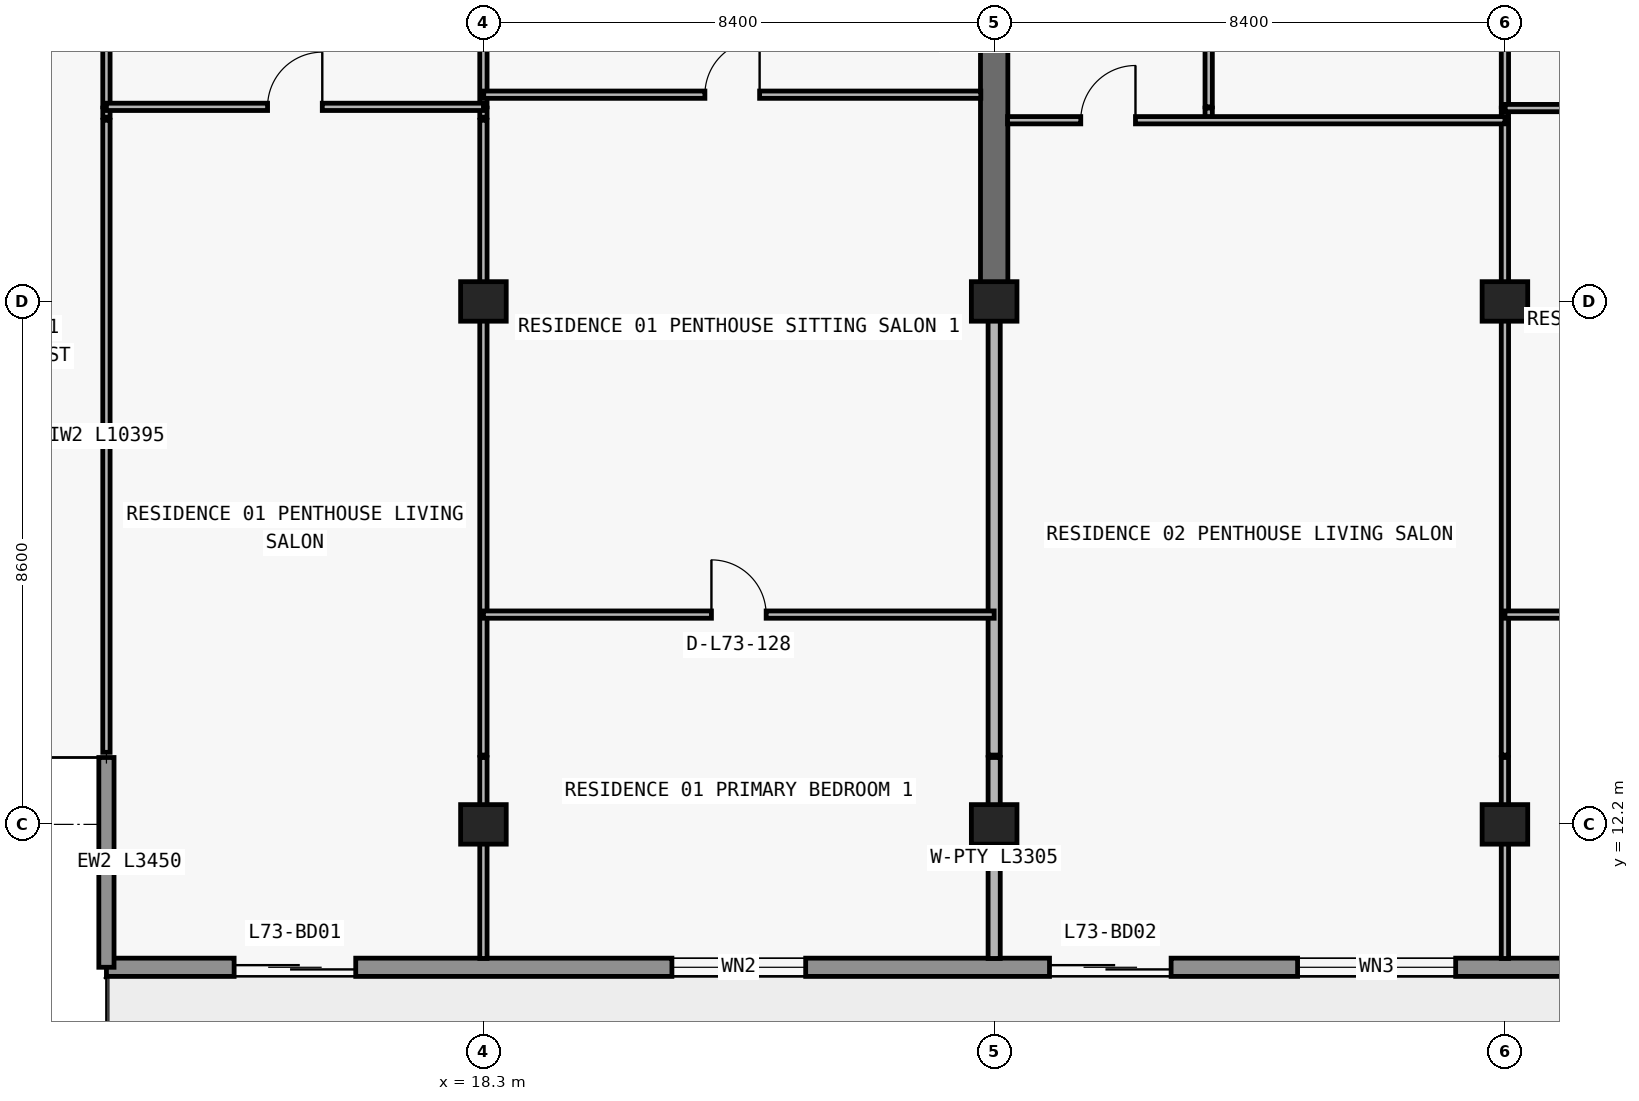
"""IFC4 building model, lengths in metres.
Left out: names, types, materials, properties, quantities, classifications, styles, units other than length and angle.
Written with IfcOpenShell. Run it as: python <this file> out.ifc"""

import sys

from ifc_helpers import new_model, si_unit, direction, frame, frame_2d, origin, origin_2d, place, context, subcontext, project, spatial, rectangle, extrude, element, fill, save


model = new_model("IFC4")
c1 = context("Model", 3, precision=1e-05, world=origin(), true_north=direction((0.0, 1.0)))
c2 = subcontext(c1, "Body", "Model", "MODEL_VIEW")
j1 = project(units=[si_unit("LENGTHUNIT", "METRE"), si_unit("PLANEANGLEUNIT", "RADIAN")], contexts=[c1])
p1 = place(None, origin())
s1 = spatial("IfcSite", under=j1, at=p1, CompositionType="ELEMENT")
p2 = place(p1, origin())
s2 = spatial("IfcBuilding", under=s1, at=p2, CompositionType="ELEMENT")
p3 = place(p2, frame((0.0, 0.0, 259.5)))
s3 = spatial("IfcBuildingStorey", under=s2, at=p3, CompositionType="ELEMENT", Elevation=259.5)
for number, where, z_axis, x_axis in (
    (1, (18.3, 12.2, 0.0), (0.0, 0.0, 1.0), (1.0, 0.0, 0.0)),
    (2, (26.7, 12.2, 0.0), (0.0, 0.0, 1.0), (1.0, 0.0, 0.0)),
    (3, (35.1, 12.2, 0.0), (0.0, 0.0, 1.0), (1.0, 0.0, 0.0)),
    (4, (18.3, 20.8, 0.0), (0.0, 0.0, 1.0), (1.0, 0.0, 0.0)),
    (5, (26.7, 20.8, 0.0), (0.0, 0.0, 1.0), (1.0, 0.0, 0.0)),
    (6, (35.1, 20.8, 0.0), (0.0, 0.0, 1.0), (1.0, 0.0, 0.0)),
):
    element("IfcColumn", number, at=place(p3, frame(where, z_axis=z_axis, x_axis=x_axis)), inside=s3, PredefinedType="COLUMN", context=c2, shape_type="SweptSolid", body=[
        extrude(rectangle(XDim=0.75, YDim=0.65, at=origin_2d()), origin(), (0.0, 0.0, 1.0), 3.05),
    ])
p4 = place(p3, frame((26.7, 20.8, 0.0), z_axis=(0.0, 0.0, 1.0), x_axis=(0.0, 1.0, 0.0)))
e7 = element("IfcWall", 7, at=p4, inside=s3, PredefinedType="SHEAR", context=c2, shape_type="SweptSolid", body=[
    extrude(rectangle(XDim=8.6, YDim=0.45, at=frame_2d((4.3, 0.0))), origin(), (0.0, 0.0, 1.0), 3.05),
])
p5 = place(p3, frame((65.7, 9.85, 0.0), z_axis=(0.0, 0.0, 1.0), x_axis=(-1.0, 0.0, 0.0)))
e8 = element("IfcWall", 8, at=p5, inside=s3, PredefinedType="STANDARD", context=c2, shape_type="SweptSolid", body=[
    extrude(rectangle(XDim=53.6, YDim=0.3, at=frame_2d((26.8, 0.0))), origin(), (0.0, 0.0, 1.0), 3.05),
])
p6 = place(p5, frame((49.5, 0.0, 0.0)))
e9 = element("IfcOpeningElement", 9, at=p6, cuts=e8, PredefinedType="OPENING", context=c2, shape_type="SweptSolid", body=[
    extrude(rectangle(XDim=2.0, YDim=2.3, at=frame_2d((1.0, 1.15))), frame((0.0, 0.16, 0.0), z_axis=(0.0, -1.0, 0.0), x_axis=(1.0, 0.0, 0.0)), (0.0, 0.0, 1.0), 0.32),
])
p7 = place(p5, frame((42.1, 0.0, 0.85)))
e10 = element("IfcOpeningElement", 10, at=p7, cuts=e8, PredefinedType="OPENING", context=c2, shape_type="SweptSolid", body=[
    extrude(rectangle(XDim=2.2, YDim=1.55, at=frame_2d((1.1, 0.775))), frame((0.0, 0.16, 0.0), z_axis=(0.0, -1.0, 0.0), x_axis=(1.0, 0.0, 0.0)), (0.0, 0.0, 1.0), 0.32),
])
p8 = place(p5, frame((36.09, 0.0, 0.0)))
e11 = element("IfcOpeningElement", 11, at=p8, cuts=e8, PredefinedType="OPENING", context=c2, shape_type="SweptSolid", body=[
    extrude(rectangle(XDim=2.0, YDim=2.3, at=frame_2d((1.0, 1.15))), frame((0.0, 0.16, 0.0), z_axis=(0.0, -1.0, 0.0), x_axis=(1.0, 0.0, 0.0)), (0.0, 0.0, 1.0), 0.32),
])
p9 = place(p5, frame((31.41, 0.0, 0.65)))
e12 = element("IfcOpeningElement", 12, at=p9, cuts=e8, PredefinedType="OPENING", context=c2, shape_type="SweptSolid", body=[
    extrude(rectangle(XDim=2.6, YDim=1.85, at=frame_2d((1.3, 0.925))), frame((0.0, 0.16, 0.0), z_axis=(0.0, -1.0, 0.0), x_axis=(1.0, 0.0, 0.0)), (0.0, 0.0, 1.0), 0.32),
])
p10 = place(p5, frame((25.7, 0.0, 0.85)))
e13 = element("IfcOpeningElement", 13, at=p10, cuts=e8, PredefinedType="OPENING", context=c2, shape_type="SweptSolid", body=[
    extrude(rectangle(XDim=2.2, YDim=1.55, at=frame_2d((1.1, 0.775))), frame((0.0, 0.16, 0.0), z_axis=(0.0, -1.0, 0.0), x_axis=(1.0, 0.0, 0.0)), (0.0, 0.0, 1.0), 0.32),
])
p11 = place(p5, frame((17.7, 0.0, 0.85)))
e14 = element("IfcOpeningElement", 14, at=p11, cuts=e8, PredefinedType="OPENING", context=c2, shape_type="SweptSolid", body=[
    extrude(rectangle(XDim=2.2, YDim=1.55, at=frame_2d((1.1, 0.775))), frame((0.0, 0.16, 0.0), z_axis=(0.0, -1.0, 0.0), x_axis=(1.0, 0.0, 0.0)), (0.0, 0.0, 1.0), 0.32),
])
p12 = place(p5, frame((11.626, 0.0, 0.0)))
e15 = element("IfcOpeningElement", 15, at=p12, cuts=e8, PredefinedType="OPENING", context=c2, shape_type="SweptSolid", body=[
    extrude(rectangle(XDim=2.0, YDim=2.3, at=frame_2d((1.0, 1.15))), frame((0.0, 0.16, 0.0), z_axis=(0.0, -1.0, 0.0), x_axis=(1.0, 0.0, 0.0)), (0.0, 0.0, 1.0), 0.32),
])
p13 = place(p5, frame((7.326, 0.0, 0.85)))
e16 = element("IfcOpeningElement", 16, at=p13, cuts=e8, PredefinedType="OPENING", context=c2, shape_type="SweptSolid", body=[
    extrude(rectangle(XDim=2.2, YDim=1.55, at=frame_2d((1.1, 0.775))), frame((0.0, 0.16, 0.0), z_axis=(0.0, -1.0, 0.0), x_axis=(1.0, 0.0, 0.0)), (0.0, 0.0, 1.0), 0.32),
])
p14 = place(p3, frame((12.1, 13.3, 0.0), z_axis=(0.0, 0.0, 1.0), x_axis=(0.0, -1.0, 0.0)))
e17 = element("IfcWall", 17, at=p14, inside=s3, PredefinedType="ELEMENTEDWALL", context=c2, shape_type="SweptSolid", body=[
    extrude(rectangle(XDim=3.45, YDim=0.25, at=frame_2d((1.725, 0.0))), origin(), (0.0, 0.0, 1.0), 3.05),
])
p15 = place(p3, frame((12.1, 13.385, 0.0), z_axis=(0.0, 0.0, 1.0), x_axis=(0.0, 1.0, 0.0)))
e18 = element("IfcWall", 18, at=p15, inside=s3, PredefinedType="PARTITIONING", context=c2, shape_type="SweptSolid", body=[
    extrude(rectangle(XDim=10.395, YDim=0.12, at=frame_2d((5.198, 0.0))), origin(), (0.0, 0.0, 1.0), 2.725),
])
p16 = place(p3, frame((12.1, 23.83, 0.0), z_axis=(0.0, 0.0, 1.0), x_axis=(0.0, 1.0, 0.0)))
e19 = element("IfcWall", 19, at=p16, inside=s3, PredefinedType="PARTITIONING", context=c2, shape_type="SweptSolid", body=[
    extrude(rectangle(XDim=0.15, YDim=0.12, at=frame_2d((0.075, 0.0))), origin(), (0.0, 0.0, 1.0), 2.725),
])
p17 = place(p3, frame((12.1, 24.0, 0.0), z_axis=(0.0, 0.0, 1.0), x_axis=(0.0, 1.0, 0.0)))
e20 = element("IfcWall", 20, at=p17, inside=s3, PredefinedType="PARTITIONING", context=c2, shape_type="SweptSolid", body=[
    extrude(rectangle(XDim=4.58, YDim=0.12, at=frame_2d((2.29, 0.0))), origin(), (0.0, 0.0, 1.0), 2.725),
])
p18 = place(p17, frame((1.84, 0.0, 0.0)))
e21 = element("IfcOpeningElement", 21, at=p18, cuts=e20, PredefinedType="OPENING", context=c2, shape_type="SweptSolid", body=[
    extrude(rectangle(XDim=0.9, YDim=2.15, at=frame_2d((0.45, 1.075))), frame((0.0, 0.07, 0.0), z_axis=(0.0, -1.0, 0.0), x_axis=(1.0, 0.0, 0.0)), (0.0, 0.0, 1.0), 0.14),
])
p19 = place(p3, frame((18.3, 9.995, 0.0), z_axis=(0.0, 0.0, 1.0), x_axis=(0.0, 1.0, 0.0)))
e22 = element("IfcWall", 22, at=p19, inside=s3, PredefinedType="PARTITIONING", context=c2, shape_type="SweptSolid", body=[
    extrude(rectangle(XDim=3.305, YDim=0.12, at=frame_2d((1.652, 0.0))), origin(), (0.0, 0.0, 1.0), 2.263),
])
p20 = place(p3, frame((18.3, 13.34, 0.0), z_axis=(0.0, 0.0, 1.0), x_axis=(0.0, 1.0, 0.0)))
e23 = element("IfcWall", 23, at=p20, inside=s3, PredefinedType="PARTITIONING", context=c2, shape_type="SweptSolid", body=[
    extrude(rectangle(XDim=10.44, YDim=0.12, at=frame_2d((5.22, 0.0))), origin(), (0.0, 0.0, 1.0), 2.263),
])
p21 = place(p3, frame((18.3, 23.83, 0.0), z_axis=(0.0, 0.0, 1.0), x_axis=(0.0, 1.0, 0.0)))
e24 = element("IfcWall", 24, at=p21, inside=s3, PredefinedType="PARTITIONING", context=c2, shape_type="SweptSolid", body=[
    extrude(rectangle(XDim=0.15, YDim=0.12, at=frame_2d((0.075, 0.0))), origin(), (0.0, 0.0, 1.0), 2.263),
])
p22 = place(p3, frame((18.3, 24.0, 0.0), z_axis=(0.0, 0.0, 1.0), x_axis=(0.0, 1.0, 0.0)))
e25 = element("IfcWall", 25, at=p22, inside=s3, PredefinedType="PARTITIONING", context=c2, shape_type="SweptSolid", body=[
    extrude(rectangle(XDim=4.58, YDim=0.12, at=frame_2d((2.29, 0.0))), origin(), (0.0, 0.0, 1.0), 2.263),
])
p23 = place(p22, frame((1.94, 0.0, 0.0)))
e26 = element("IfcOpeningElement", 26, at=p23, cuts=e25, PredefinedType="OPENING", context=c2, shape_type="SweptSolid", body=[
    extrude(rectangle(XDim=0.9, YDim=2.15, at=frame_2d((0.45, 1.075))), frame((0.0, 0.07, 0.0), z_axis=(0.0, -1.0, 0.0), x_axis=(1.0, 0.0, 0.0)), (0.0, 0.0, 1.0), 0.14),
])
p24 = place(p3, frame((26.7, 9.995, 0.0), z_axis=(0.0, 0.0, 1.0), x_axis=(0.0, 1.0, 0.0)))
e27 = element("IfcWall", 27, at=p24, inside=s3, PredefinedType="PARTITIONING", context=c2, shape_type="SweptSolid", body=[
    extrude(rectangle(XDim=3.305, YDim=0.2, at=frame_2d((1.652, 0.0))), origin(), (0.0, 0.0, 1.0), 2.263),
])
p25 = place(p3, frame((26.7, 13.34, 0.0), z_axis=(0.0, 0.0, 1.0), x_axis=(0.0, 1.0, 0.0)))
e28 = element("IfcWall", 28, at=p25, inside=s3, PredefinedType="PARTITIONING", context=c2, shape_type="SweptSolid", body=[
    extrude(rectangle(XDim=7.455, YDim=0.2, at=frame_2d((3.728, 0.0))), origin(), (0.0, 0.0, 1.0), 2.263),
])
p26 = place(p3, frame((30.228, 23.83, 0.0), z_axis=(0.0, 0.0, 1.0), x_axis=(0.0, 1.0, 0.0)))
e29 = element("IfcWall", 29, at=p26, inside=s3, PredefinedType="PARTITIONING", context=c2, shape_type="SweptSolid", body=[
    extrude(rectangle(XDim=0.15, YDim=0.12, at=frame_2d((0.075, 0.0))), origin(), (0.0, 0.0, 1.0), 3.05),
])
p27 = place(p3, frame((30.228, 24.0, 0.0), z_axis=(0.0, 0.0, 1.0), x_axis=(0.0, 1.0, 0.0)))
e30 = element("IfcWall", 30, at=p27, inside=s3, PredefinedType="PARTITIONING", context=c2, shape_type="SweptSolid", body=[
    extrude(rectangle(XDim=4.58, YDim=0.12, at=frame_2d((2.29, 0.0))), origin(), (0.0, 0.0, 1.0), 3.05),
])
p28 = place(p27, frame((1.84, 0.0, 0.0)))
e31 = element("IfcOpeningElement", 31, at=p28, cuts=e30, PredefinedType="OPENING", context=c2, shape_type="SweptSolid", body=[
    extrude(rectangle(XDim=0.9, YDim=2.15, at=frame_2d((0.45, 1.075))), frame((0.0, 0.07, 0.0), z_axis=(0.0, -1.0, 0.0), x_axis=(1.0, 0.0, 0.0)), (0.0, 0.0, 1.0), 0.14),
])
p29 = place(p3, frame((35.1, 9.995, 0.0), z_axis=(0.0, 0.0, 1.0), x_axis=(0.0, 1.0, 0.0)))
e32 = element("IfcWall", 32, at=p29, inside=s3, PredefinedType="PARTITIONING", context=c2, shape_type="SweptSolid", body=[
    extrude(rectangle(XDim=3.305, YDim=0.12, at=frame_2d((1.652, 0.0))), origin(), (0.0, 0.0, 1.0), 2.263),
])
p30 = place(p3, frame((35.1, 13.34, 0.0), z_axis=(0.0, 0.0, 1.0), x_axis=(0.0, 1.0, 0.0)))
e33 = element("IfcWall", 33, at=p30, inside=s3, PredefinedType="PARTITIONING", context=c2, shape_type="SweptSolid", body=[
    extrude(rectangle(XDim=10.44, YDim=0.12, at=frame_2d((5.22, 0.0))), origin(), (0.0, 0.0, 1.0), 2.263),
])
p31 = place(p3, frame((35.1, 23.83, 0.0), z_axis=(0.0, 0.0, 1.0), x_axis=(0.0, 1.0, 0.0)))
e34 = element("IfcWall", 34, at=p31, inside=s3, PredefinedType="PARTITIONING", context=c2, shape_type="SweptSolid", body=[
    extrude(rectangle(XDim=0.15, YDim=0.12, at=frame_2d((0.075, 0.0))), origin(), (0.0, 0.0, 1.0), 2.263),
])
p32 = place(p3, frame((35.1, 24.0, 0.0), z_axis=(0.0, 0.0, 1.0), x_axis=(0.0, 1.0, 0.0)))
e35 = element("IfcWall", 35, at=p32, inside=s3, PredefinedType="PARTITIONING", context=c2, shape_type="SweptSolid", body=[
    extrude(rectangle(XDim=4.58, YDim=0.12, at=frame_2d((2.29, 0.0))), origin(), (0.0, 0.0, 1.0), 2.263),
])
p33 = place(p32, frame((1.74, 0.0, 0.0)))
e36 = element("IfcOpeningElement", 36, at=p33, cuts=e35, PredefinedType="OPENING", context=c2, shape_type="SweptSolid", body=[
    extrude(rectangle(XDim=0.9, YDim=2.15, at=frame_2d((0.45, 1.075))), frame((0.0, 0.07, 0.0), z_axis=(0.0, -1.0, 0.0), x_axis=(1.0, 0.0, 0.0)), (0.0, 0.0, 1.0), 0.14),
])
p34 = place(p3, frame((18.3, 15.65, 0.0), z_axis=(0.0, 0.0, 1.0), x_axis=(1.0, 0.0, 0.0)))
e37 = element("IfcWall", 37, at=p34, inside=s3, PredefinedType="PARTITIONING", context=c2, shape_type="SweptSolid", body=[
    extrude(rectangle(XDim=8.4, YDim=0.12, at=frame_2d((4.2, 0.0))), origin(), (0.0, 0.0, 1.0), 3.05),
])
p35 = place(p34, frame((3.75, 0.0, 0.0)))
e38 = element("IfcOpeningElement", 38, at=p35, cuts=e37, PredefinedType="OPENING", context=c2, shape_type="SweptSolid", body=[
    extrude(rectangle(XDim=0.9, YDim=2.15, at=frame_2d((0.45, 1.075))), frame((0.0, 0.07, 0.0), z_axis=(0.0, -1.0, 0.0), x_axis=(1.0, 0.0, 0.0)), (0.0, 0.0, 1.0), 0.14),
])
p36 = place(p3, frame((35.1, 15.65, 0.0), z_axis=(0.0, 0.0, 1.0), x_axis=(1.0, 0.0, 0.0)))
e39 = element("IfcWall", 39, at=p36, inside=s3, PredefinedType="PARTITIONING", context=c2, shape_type="SweptSolid", body=[
    extrude(rectangle(XDim=16.0, YDim=0.12, at=frame_2d((8.0, 0.0))), origin(), (0.0, 0.0, 1.0), 3.05),
])
p37 = place(p36, frame((3.35, 0.0, 0.0)))
e40 = element("IfcOpeningElement", 40, at=p37, cuts=e39, PredefinedType="OPENING", context=c2, shape_type="SweptSolid", body=[
    extrude(rectangle(XDim=0.9, YDim=2.15, at=frame_2d((0.45, 1.075))), frame((0.0, 0.07, 0.0), z_axis=(0.0, -1.0, 0.0), x_axis=(1.0, 0.0, 0.0)), (0.0, 0.0, 1.0), 0.14),
])
p38 = place(p36, frame((11.35, 0.0, 0.0)))
e41 = element("IfcOpeningElement", 41, at=p38, cuts=e39, PredefinedType="OPENING", context=c2, shape_type="SweptSolid", body=[
    extrude(rectangle(XDim=0.9, YDim=2.15, at=frame_2d((0.45, 1.075))), frame((0.0, 0.07, 0.0), z_axis=(0.0, -1.0, 0.0), x_axis=(1.0, 0.0, 0.0)), (0.0, 0.0, 1.0), 0.14),
])
p39 = place(p3, frame((26.92, 23.78, 0.0), z_axis=(0.0, 0.0, 1.0), x_axis=(1.0, 0.0, 0.0)))
e42 = element("IfcWall", 42, at=p39, inside=s3, PredefinedType="PARTITIONING", context=c2, shape_type="SweptSolid", body=[
    extrude(rectangle(XDim=8.18, YDim=0.12, at=frame_2d((4.09, 0.0))), origin(), (0.0, 0.0, 1.0), 3.05),
])
p40 = place(p39, frame((1.204, 0.0, 0.0)))
e43 = element("IfcOpeningElement", 43, at=p40, cuts=e42, PredefinedType="OPENING", context=c2, shape_type="SweptSolid", body=[
    extrude(rectangle(XDim=0.9, YDim=2.15, at=frame_2d((0.45, 1.075))), frame((0.0, 0.07, 0.0), z_axis=(0.0, -1.0, 0.0), x_axis=(1.0, 0.0, 0.0)), (0.0, 0.0, 1.0), 0.14),
])
p41 = place(p3, frame((35.105, 23.98, 0.0), z_axis=(0.0, 0.0, 1.0), x_axis=(1.0, 0.0, 0.0)))
e44 = element("IfcWall", 44, at=p41, inside=s3, PredefinedType="PARTITIONING", context=c2, shape_type="SweptSolid", body=[
    extrude(rectangle(XDim=7.59, YDim=0.12, at=frame_2d((3.795, 0.0))), origin(), (0.0, 0.0, 1.0), 3.05),
])
p42 = place(p41, frame((3.345, 0.0, 0.0)))
e45 = element("IfcOpeningElement", 45, at=p42, cuts=e44, PredefinedType="OPENING", context=c2, shape_type="SweptSolid", body=[
    extrude(rectangle(XDim=0.9, YDim=2.15, at=frame_2d((0.45, 1.075))), frame((0.0, 0.07, 0.0), z_axis=(0.0, -1.0, 0.0), x_axis=(1.0, 0.0, 0.0)), (0.0, 0.0, 1.0), 0.14),
])
p43 = place(p3, frame((12.1, 24.0, 0.0), z_axis=(0.0, 0.0, 1.0), x_axis=(1.0, 0.0, 0.0)))
e46 = element("IfcWall", 46, at=p43, inside=s3, PredefinedType="PARTITIONING", context=c2, shape_type="SweptSolid", body=[
    extrude(rectangle(XDim=6.2, YDim=0.12, at=frame_2d((3.1, 0.0))), origin(), (0.0, 0.0, 1.0), 3.05),
])
p44 = place(p43, frame((2.65, 0.0, 0.0)))
e47 = element("IfcOpeningElement", 47, at=p44, cuts=e46, PredefinedType="OPENING", context=c2, shape_type="SweptSolid", body=[
    extrude(rectangle(XDim=0.9, YDim=2.15, at=frame_2d((0.45, 1.075))), frame((0.0, 0.07, 0.0), z_axis=(0.0, -1.0, 0.0), x_axis=(1.0, 0.0, 0.0)), (0.0, 0.0, 1.0), 0.14),
])
p45 = place(p3, frame((18.305, 24.2, 0.0), z_axis=(0.0, 0.0, 1.0), x_axis=(1.0, 0.0, 0.0)))
e48 = element("IfcWall", 48, at=p45, inside=s3, PredefinedType="PARTITIONING", context=c2, shape_type="SweptSolid", body=[
    extrude(rectangle(XDim=8.175, YDim=0.12, at=frame_2d((4.087, 0.0))), origin(), (0.0, 0.0, 1.0), 3.05),
])
p46 = place(p45, frame((3.637, 0.0, 0.0)))
e49 = element("IfcOpeningElement", 49, at=p46, cuts=e48, PredefinedType="OPENING", context=c2, shape_type="SweptSolid", body=[
    extrude(rectangle(XDim=0.9, YDim=2.15, at=frame_2d((0.45, 1.075))), frame((0.0, 0.07, 0.0), z_axis=(0.0, -1.0, 0.0), x_axis=(1.0, 0.0, 0.0)), (0.0, 0.0, 1.0), 0.14),
])
p47 = place(p6, origin())
e50 = element("IfcDoor", 50, at=p47, inside=s3, OperationType="DOUBLE_DOOR_SLIDING", PredefinedType="DOOR", context=c2, shape_type="SweptSolid", body=[
    extrude(rectangle(XDim=2.0, YDim=2.3, at=frame_2d((1.0, 1.15))), frame((0.0, 0.025, 0.0), z_axis=(0.0, -1.0, 0.0), x_axis=(1.0, 0.0, 0.0)), (0.0, 0.0, 1.0), 0.05),
])
fill(e9, e50)
p48 = place(p7, origin())
e51 = element("IfcWindow", 51, at=p48, inside=s3, PartitioningType="SINGLE_PANEL", PredefinedType="WINDOW", context=c2, shape_type="SweptSolid", body=[
    extrude(rectangle(XDim=2.2, YDim=1.55, at=frame_2d((1.1, 0.775))), frame((0.0, 0.03, 0.0), z_axis=(0.0, -1.0, 0.0), x_axis=(1.0, 0.0, 0.0)), (0.0, 0.0, 1.0), 0.06),
])
fill(e10, e51)
p49 = place(p8, origin())
e52 = element("IfcDoor", 52, at=p49, inside=s3, OperationType="DOUBLE_DOOR_SLIDING", PredefinedType="DOOR", context=c2, shape_type="SweptSolid", body=[
    extrude(rectangle(XDim=2.0, YDim=2.3, at=frame_2d((1.0, 1.15))), frame((0.0, 0.025, 0.0), z_axis=(0.0, -1.0, 0.0), x_axis=(1.0, 0.0, 0.0)), (0.0, 0.0, 1.0), 0.05),
])
fill(e11, e52)
p50 = place(p9, origin())
e53 = element("IfcWindow", 53, at=p50, inside=s3, PartitioningType="SINGLE_PANEL", PredefinedType="WINDOW", context=c2, shape_type="SweptSolid", body=[
    extrude(rectangle(XDim=2.6, YDim=1.85, at=frame_2d((1.3, 0.925))), frame((0.0, 0.03, 0.0), z_axis=(0.0, -1.0, 0.0), x_axis=(1.0, 0.0, 0.0)), (0.0, 0.0, 1.0), 0.06),
])
fill(e12, e53)
p51 = place(p44, origin())
e54 = element("IfcDoor", 54, at=p51, inside=s3, OperationType="SINGLE_SWING_RIGHT", PredefinedType="DOOR", context=c2, shape_type="SweptSolid", body=[
    extrude(rectangle(XDim=0.9, YDim=2.15, at=frame_2d((0.45, 1.075))), frame((0.0, 0.025, 0.0), z_axis=(0.0, -1.0, 0.0), x_axis=(1.0, 0.0, 0.0)), (0.0, 0.0, 1.0), 0.05),
])
fill(e47, e54)
p52 = place(p46, origin())
e55 = element("IfcDoor", 55, at=p52, inside=s3, OperationType="SINGLE_SWING_RIGHT", PredefinedType="DOOR", context=c2, shape_type="SweptSolid", body=[
    extrude(rectangle(XDim=0.9, YDim=2.15, at=frame_2d((0.45, 1.075))), frame((0.0, 0.025, 0.0), z_axis=(0.0, -1.0, 0.0), x_axis=(1.0, 0.0, 0.0)), (0.0, 0.0, 1.0), 0.05),
])
fill(e49, e55)
p53 = place(p35, origin())
e56 = element("IfcDoor", 56, at=p53, inside=s3, OperationType="SINGLE_SWING_LEFT", PredefinedType="DOOR", context=c2, shape_type="SweptSolid", body=[
    extrude(rectangle(XDim=0.9, YDim=2.15, at=frame_2d((0.45, 1.075))), frame((0.0, 0.025, 0.0), z_axis=(0.0, -1.0, 0.0), x_axis=(1.0, 0.0, 0.0)), (0.0, 0.0, 1.0), 0.05),
])
fill(e38, e56)
p54 = place(p40, origin())
e57 = element("IfcDoor", 57, at=p54, inside=s3, OperationType="SINGLE_SWING_RIGHT", PredefinedType="DOOR", context=c2, shape_type="SweptSolid", body=[
    extrude(rectangle(XDim=0.9, YDim=2.15, at=frame_2d((0.45, 1.075))), frame((0.0, 0.025, 0.0), z_axis=(0.0, -1.0, 0.0), x_axis=(1.0, 0.0, 0.0)), (0.0, 0.0, 1.0), 0.05),
])
fill(e43, e57)
save(model, sys.argv[1])
